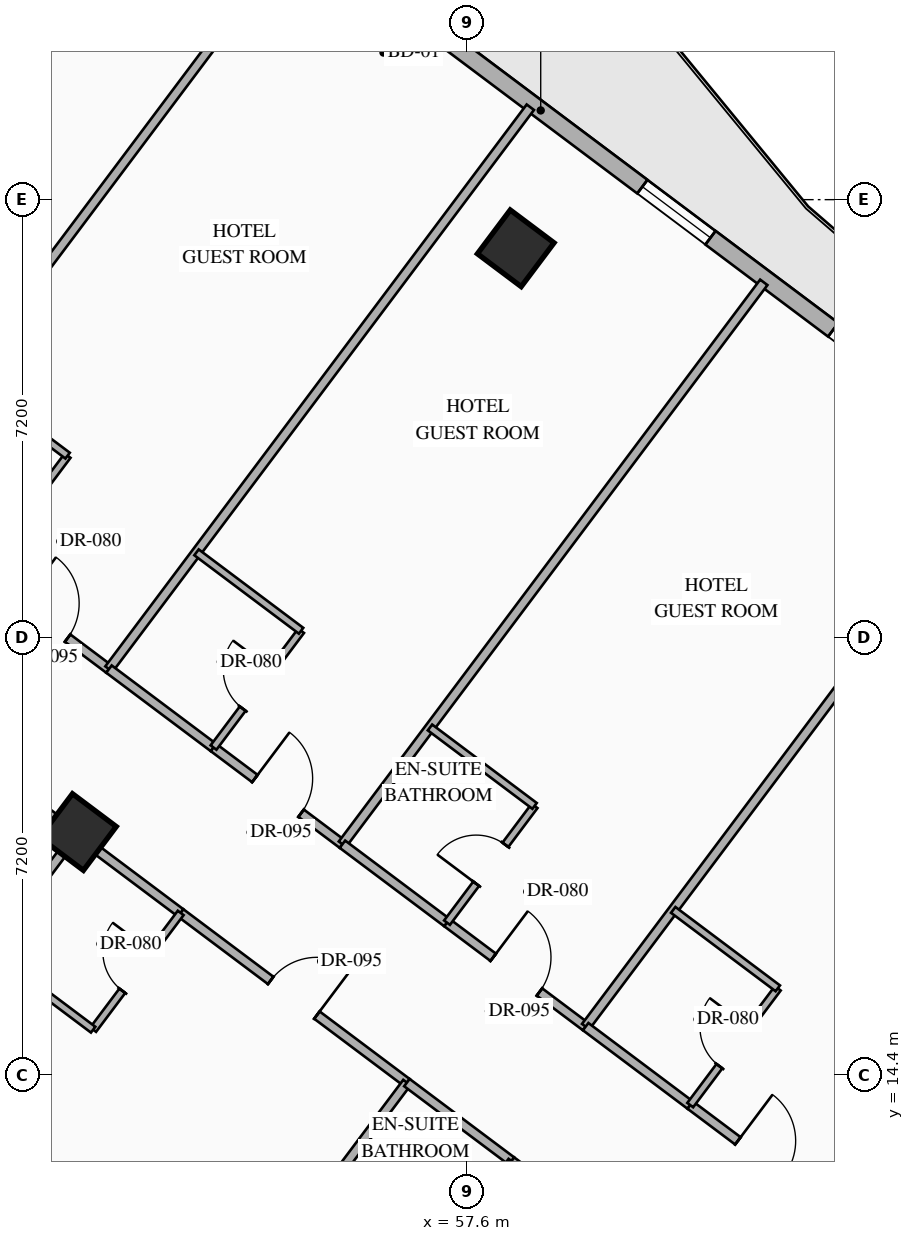
"""IFC4 building model, lengths in metres.
Left out: names, types, materials, properties, quantities, classifications, styles, units other than length and angle.
Written with IfcOpenShell. Run it as: python <this file> out.ifc"""

import sys

from ifc_helpers import new_model, si_unit, direction, frame, frame_2d, origin, origin_2d, place, context, subcontext, project, spatial, rectangle, hollow_rectangle, extrude, element, fill, save


model = new_model("IFC4")
c1 = context("Model", 3, precision=1e-05, world=origin(), true_north=direction((0.0, 1.0)))
c2 = subcontext(c1, "Body", "Model", "MODEL_VIEW")
j1 = project(units=[si_unit("LENGTHUNIT", "METRE"), si_unit("PLANEANGLEUNIT", "RADIAN")], contexts=[c1])
p1 = place(None, origin())
s1 = spatial("IfcSite", under=j1, at=p1, CompositionType="ELEMENT")
p2 = place(p1, origin())
s2 = spatial("IfcBuilding", under=s1, at=p2, CompositionType="ELEMENT")
p3 = place(p2, frame((0.0, 0.0, 88.0)))
s3 = spatial("IfcBuildingStorey", under=s2, at=p3, CompositionType="ELEMENT", Elevation=88.0)
for number, where, z_axis, x_axis in (
    (1, (58.4, 28.0, 0.0), (0.0, 0.0, 1.0), (0.8, -0.6, 0.0)),
    (2, (51.2, 18.4, 0.0), (0.0, 0.0, 1.0), (0.8, -0.6, 0.0)),
):
    element("IfcColumn", number, at=place(p3, frame(where, z_axis=z_axis, x_axis=x_axis)), inside=s3, PredefinedType="COLUMN", context=c2, shape_type="SweptSolid", body=[
        extrude(hollow_rectangle(XDim=0.9, YDim=0.9, WallThickness=0.036, at=origin_2d()), origin(), (0.0, 0.0, 1.0), 3.35),
    ])
p4 = place(p3, frame((44.86, 40.73, 0.0), z_axis=(0.0, 0.0, 1.0), x_axis=(0.800006902154, -0.599990797017, 0.0)))
e3 = element("IfcWall", 3, at=p4, inside=s3, PredefinedType="STANDARD", context=c2, shape_type="SweptSolid", body=[
    extrude(rectangle(XDim=29.712, YDim=0.28, at=frame_2d((14.856, 0.0))), origin(), (0.0, 0.0, 1.0), 3.05),
])
p5 = place(p4, frame((14.249, 0.0, 0.0)))
e4 = element("IfcOpeningElement", 4, at=p5, cuts=e3, PredefinedType="OPENING", context=c2, shape_type="SweptSolid", body=[
    extrude(rectangle(XDim=1.1, YDim=2.2, at=frame_2d((0.55, 1.1))), frame((0.0, 0.15, 0.0), z_axis=(0.0, -1.0, 0.0), x_axis=(1.0, 0.0, 0.0)), (0.0, 0.0, 1.0), 0.3),
])
p6 = place(p4, frame((1.612, 0.0, 0.85)))
e5 = element("IfcOpeningElement", 5, at=p6, cuts=e3, PredefinedType="OPENING", context=c2, shape_type="SweptSolid", body=[
    extrude(rectangle(XDim=1.4, YDim=1.8, at=frame_2d((0.7, 0.9))), frame((0.0, 0.15, 0.0), z_axis=(0.0, -1.0, 0.0), x_axis=(1.0, 0.0, 0.0)), (0.0, 0.0, 1.0), 0.3),
])
p7 = place(p4, frame((5.667, 0.0, 0.85)))
e6 = element("IfcOpeningElement", 6, at=p7, cuts=e3, PredefinedType="OPENING", context=c2, shape_type="SweptSolid", body=[
    extrude(rectangle(XDim=1.4, YDim=1.8, at=frame_2d((0.7, 0.9))), frame((0.0, 0.15, 0.0), z_axis=(0.0, -1.0, 0.0), x_axis=(1.0, 0.0, 0.0)), (0.0, 0.0, 1.0), 0.3),
])
p8 = place(p4, frame((9.912, 0.0, 0.85)))
e7 = element("IfcOpeningElement", 7, at=p8, cuts=e3, PredefinedType="OPENING", context=c2, shape_type="SweptSolid", body=[
    extrude(rectangle(XDim=1.4, YDim=1.8, at=frame_2d((0.7, 0.9))), frame((0.0, 0.15, 0.0), z_axis=(0.0, -1.0, 0.0), x_axis=(1.0, 0.0, 0.0)), (0.0, 0.0, 1.0), 0.3),
])
p9 = place(p4, frame((19.528, 0.0, 0.85)))
e8 = element("IfcOpeningElement", 8, at=p9, cuts=e3, PredefinedType="OPENING", context=c2, shape_type="SweptSolid", body=[
    extrude(rectangle(XDim=1.4, YDim=1.8, at=frame_2d((0.7, 0.9))), frame((0.0, 0.15, 0.0), z_axis=(0.0, -1.0, 0.0), x_axis=(1.0, 0.0, 0.0)), (0.0, 0.0, 1.0), 0.3),
])
p10 = place(p4, frame((23.451, 0.0, 0.85)))
e9 = element("IfcOpeningElement", 9, at=p10, cuts=e3, PredefinedType="OPENING", context=c2, shape_type="SweptSolid", body=[
    extrude(rectangle(XDim=1.4, YDim=1.8, at=frame_2d((0.7, 0.9))), frame((0.0, 0.15, 0.0), z_axis=(0.0, -1.0, 0.0), x_axis=(1.0, 0.0, 0.0)), (0.0, 0.0, 1.0), 0.3),
])
p11 = place(p4, frame((27.852, 0.0, 0.85)))
e10 = element("IfcOpeningElement", 10, at=p11, cuts=e3, PredefinedType="OPENING", context=c2, shape_type="SweptSolid", body=[
    extrude(rectangle(XDim=1.4, YDim=1.8, at=frame_2d((0.7, 0.9))), frame((0.0, 0.15, 0.0), z_axis=(0.0, -1.0, 0.0), x_axis=(1.0, 0.0, 0.0)), (0.0, 0.0, 1.0), 0.3),
])
p12 = place(p3, frame((49.59, 22.67, 0.0), z_axis=(0.0, 0.0, 1.0), x_axis=(0.800011056104, -0.599985258246, 0.0)))
e11 = element("IfcWall", 11, at=p12, inside=s3, PredefinedType="PARTITIONING", context=c2, shape_type="SweptSolid", body=[
    extrude(rectangle(XDim=2.65, YDim=0.15, at=frame_2d((1.325, 0.0))), origin(), (0.0, 0.0, 1.0), 2.695),
])
p13 = place(p12, frame((0.85, 0.0, 0.0)))
e12 = element("IfcOpeningElement", 12, at=p13, cuts=e11, PredefinedType="OPENING", context=c2, shape_type="SweptSolid", body=[
    extrude(rectangle(XDim=0.95, YDim=2.15, at=frame_2d((0.475, 1.075))), frame((0.0, 0.085, 0.0), z_axis=(0.0, -1.0, 0.0), x_axis=(1.0, 0.0, 0.0)), (0.0, 0.0, 1.0), 0.17),
])
p14 = place(p3, frame((49.59, 22.67, 0.0), z_axis=(0.0, 0.0, 1.0), x_axis=(0.599951172744, 0.800036618114, 0.0)))
e13 = element("IfcWall", 13, at=p14, inside=s3, PredefinedType="PARTITIONING", context=c2, shape_type="SweptSolid", body=[
    extrude(rectangle(XDim=2.4, YDim=0.12, at=frame_2d((1.2, 0.0))), origin(), (0.0, 0.0, 1.0), 3.05),
])
p15 = place(p14, frame((0.8, 0.0, 0.0)))
e14 = element("IfcOpeningElement", 14, at=p15, cuts=e13, PredefinedType="OPENING", context=c2, shape_type="SweptSolid", body=[
    extrude(rectangle(XDim=0.8, YDim=2.06, at=frame_2d((0.4, 1.03))), frame((0.0, 0.07, 0.0), z_axis=(0.0, -1.0, 0.0), x_axis=(1.0, 0.0, 0.0)), (0.0, 0.0, 1.0), 0.14),
])
p16 = place(p3, frame((49.31, 25.88, 0.0), z_axis=(0.0, 0.0, 1.0), x_axis=(0.800040880289, -0.59994548908, 0.0)))
e15 = element("IfcWall", 15, at=p16, inside=s3, PredefinedType="PARTITIONING", context=c2, shape_type="SweptSolid", body=[
    extrude(rectangle(XDim=2.15, YDim=0.12, at=frame_2d((1.075, 0.0))), origin(), (0.0, 0.0, 1.0), 3.05),
])
for number, where, z_axis, x_axis in (
    (16, (47.87, 23.96, 0.0), (0.0, 0.0, 1.0), (0.6, 0.8, 0.0)),
    (17, (51.71, 21.08, 0.0), (0.0, 0.0, 1.0), (0.6, 0.8, 0.0)),
):
    element("IfcWall", number, at=place(p3, frame(where, z_axis=z_axis, x_axis=x_axis)), inside=s3, PredefinedType="PARTITIONING", context=c2, shape_type="SweptSolid", body=[
        extrude(rectangle(XDim=11.55, YDim=0.15, at=frame_2d((5.775, 0.0))), origin(), (0.0, 0.0, 1.0), 3.05),
    ])
p17 = place(p3, frame((51.71, 21.08, 0.0), z_axis=(0.0, 0.0, 1.0), x_axis=(0.79998637334, -0.60001816845, 0.0)))
e18 = element("IfcWall", 18, at=p17, inside=s3, PredefinedType="PARTITIONING", context=c2, shape_type="SweptSolid", body=[
    extrude(rectangle(XDim=2.15, YDim=0.15, at=frame_2d((1.075, 0.0))), origin(), (0.0, 0.0, 1.0), 2.695),
])
p18 = place(p3, frame((53.43, 19.79, 0.0), z_axis=(0.0, 0.0, 1.0), x_axis=(0.8, -0.6, 0.0)))
e19 = element("IfcWall", 19, at=p18, inside=s3, PredefinedType="PARTITIONING", context=c2, shape_type="SweptSolid", body=[
    extrude(rectangle(XDim=2.65, YDim=0.15, at=frame_2d((1.325, 0.0))), origin(), (0.0, 0.0, 1.0), 2.695),
])
p19 = place(p18, frame((0.85, 0.0, 0.0)))
e20 = element("IfcOpeningElement", 20, at=p19, cuts=e19, PredefinedType="OPENING", context=c2, shape_type="SweptSolid", body=[
    extrude(rectangle(XDim=0.95, YDim=2.15, at=frame_2d((0.475, 1.075))), frame((0.0, 0.085, 0.0), z_axis=(0.0, -1.0, 0.0), x_axis=(1.0, 0.0, 0.0)), (0.0, 0.0, 1.0), 0.17),
])
p20 = place(p3, frame((53.43, 19.79, 0.0), z_axis=(0.0, 0.0, 1.0), x_axis=(0.600065100855, 0.79995117022, 0.0)))
e21 = element("IfcWall", 21, at=p20, inside=s3, PredefinedType="PARTITIONING", context=c2, shape_type="SweptSolid", body=[
    extrude(rectangle(XDim=2.4, YDim=0.12, at=frame_2d((1.2, 0.0))), origin(), (0.0, 0.0, 1.0), 3.05),
])
p21 = place(p20, frame((0.8, 0.0, 0.0)))
e22 = element("IfcOpeningElement", 22, at=p21, cuts=e21, PredefinedType="OPENING", context=c2, shape_type="SweptSolid", body=[
    extrude(rectangle(XDim=0.8, YDim=2.06, at=frame_2d((0.4, 1.03))), frame((0.0, 0.07, 0.0), z_axis=(0.0, -1.0, 0.0), x_axis=(1.0, 0.0, 0.0)), (0.0, 0.0, 1.0), 0.14),
])
p22 = place(p3, frame((53.15, 23.0, 0.0), z_axis=(0.0, 0.0, 1.0), x_axis=(0.800027249606, -0.599963665473, 0.0)))
e23 = element("IfcWall", 23, at=p22, inside=s3, PredefinedType="PARTITIONING", context=c2, shape_type="SweptSolid", body=[
    extrude(rectangle(XDim=2.15, YDim=0.12, at=frame_2d((1.075, 0.0))), origin(), (0.0, 0.0, 1.0), 3.05),
])
p23 = place(p3, frame((55.55, 18.2, 0.0), z_axis=(0.0, 0.0, 1.0), x_axis=(0.599996617946, 0.80000253653, 0.0)))
e24 = element("IfcWall", 24, at=p23, inside=s3, PredefinedType="PARTITIONING", context=c2, shape_type="SweptSolid", body=[
    extrude(rectangle(XDim=11.55, YDim=0.15, at=frame_2d((5.775, 0.0))), origin(), (0.0, 0.0, 1.0), 3.05),
])
p24 = place(p3, frame((55.55, 18.2, 0.0), z_axis=(0.0, 0.0, 1.0), x_axis=(0.79998637334, -0.60001816845, 0.0)))
e25 = element("IfcWall", 25, at=p24, inside=s3, PredefinedType="PARTITIONING", context=c2, shape_type="SweptSolid", body=[
    extrude(rectangle(XDim=2.15, YDim=0.15, at=frame_2d((1.075, 0.0))), origin(), (0.0, 0.0, 1.0), 2.695),
])
p25 = place(p3, frame((57.27, 16.91, 0.0), z_axis=(0.0, 0.0, 1.0), x_axis=(0.800010279488, -0.599986293772, 0.0)))
e26 = element("IfcWall", 26, at=p25, inside=s3, PredefinedType="PARTITIONING", context=c2, shape_type="SweptSolid", body=[
    extrude(rectangle(XDim=2.85, YDim=0.15, at=frame_2d((1.425, 0.0))), origin(), (0.0, 0.0, 1.0), 2.695),
])
p26 = place(p25, frame((0.95, 0.0, 0.0)))
e27 = element("IfcOpeningElement", 27, at=p26, cuts=e26, PredefinedType="OPENING", context=c2, shape_type="SweptSolid", body=[
    extrude(rectangle(XDim=0.95, YDim=2.15, at=frame_2d((0.475, 1.075))), frame((0.0, 0.085, 0.0), z_axis=(0.0, -1.0, 0.0), x_axis=(1.0, 0.0, 0.0)), (0.0, 0.0, 1.0), 0.17),
])
p27 = place(p3, frame((57.27, 16.91, 0.0), z_axis=(0.0, 0.0, 1.0), x_axis=(0.599951172744, 0.800036618114, 0.0)))
e28 = element("IfcWall", 28, at=p27, inside=s3, PredefinedType="PARTITIONING", context=c2, shape_type="SweptSolid", body=[
    extrude(rectangle(XDim=2.4, YDim=0.12, at=frame_2d((1.2, 0.0))), origin(), (0.0, 0.0, 1.0), 3.05),
])
p28 = place(p27, frame((0.8, 0.0, 0.0)))
e29 = element("IfcOpeningElement", 29, at=p28, cuts=e28, PredefinedType="OPENING", context=c2, shape_type="SweptSolid", body=[
    extrude(rectangle(XDim=0.8, YDim=2.06, at=frame_2d((0.4, 1.03))), frame((0.0, 0.07, 0.0), z_axis=(0.0, -1.0, 0.0), x_axis=(1.0, 0.0, 0.0)), (0.0, 0.0, 1.0), 0.14),
])
p29 = place(p3, frame((56.99, 20.12, 0.0), z_axis=(0.0, 0.0, 1.0), x_axis=(0.79998637334, -0.60001816845, 0.0)))
e30 = element("IfcWall", 30, at=p29, inside=s3, PredefinedType="PARTITIONING", context=c2, shape_type="SweptSolid", body=[
    extrude(rectangle(XDim=2.15, YDim=0.12, at=frame_2d((1.075, 0.0))), origin(), (0.0, 0.0, 1.0), 3.05),
])
p30 = place(p3, frame((59.55, 15.2, 0.0), z_axis=(0.0, 0.0, 1.0), x_axis=(0.599996617946, 0.80000253653, 0.0)))
e31 = element("IfcWall", 31, at=p30, inside=s3, PredefinedType="PARTITIONING", context=c2, shape_type="SweptSolid", body=[
    extrude(rectangle(XDim=11.55, YDim=0.15, at=frame_2d((5.775, 0.0))), origin(), (0.0, 0.0, 1.0), 3.05),
])
p31 = place(p3, frame((59.55, 15.2, 0.0), z_axis=(0.0, 0.0, 1.0), x_axis=(0.79998637334, -0.60001816845, 0.0)))
e32 = element("IfcWall", 32, at=p31, inside=s3, PredefinedType="PARTITIONING", context=c2, shape_type="SweptSolid", body=[
    extrude(rectangle(XDim=2.15, YDim=0.15, at=frame_2d((1.075, 0.0))), origin(), (0.0, 0.0, 1.0), 2.695),
])
p32 = place(p3, frame((61.27, 13.91, 0.0), z_axis=(0.0, 0.0, 1.0), x_axis=(0.800010068184, -0.59998657552, 0.0)))
e33 = element("IfcWall", 33, at=p32, inside=s3, PredefinedType="PARTITIONING", context=c2, shape_type="SweptSolid", body=[
    extrude(rectangle(XDim=2.91, YDim=0.15, at=frame_2d((1.455, 0.0))), origin(), (0.0, 0.0, 1.0), 3.05),
])
p33 = place(p32, frame((0.98, 0.0, 0.0)))
e34 = element("IfcOpeningElement", 34, at=p33, cuts=e33, PredefinedType="OPENING", context=c2, shape_type="SweptSolid", body=[
    extrude(rectangle(XDim=0.95, YDim=2.15, at=frame_2d((0.475, 1.075))), frame((0.0, 0.085, 0.0), z_axis=(0.0, -1.0, 0.0), x_axis=(1.0, 0.0, 0.0)), (0.0, 0.0, 1.0), 0.17),
])
p34 = place(p3, frame((61.27, 13.91, 0.0), z_axis=(0.0, 0.0, 1.0), x_axis=(0.599951172744, 0.800036618114, 0.0)))
e35 = element("IfcWall", 35, at=p34, inside=s3, PredefinedType="PARTITIONING", context=c2, shape_type="SweptSolid", body=[
    extrude(rectangle(XDim=2.4, YDim=0.12, at=frame_2d((1.2, 0.0))), origin(), (0.0, 0.0, 1.0), 3.05),
])
p35 = place(p34, frame((0.8, 0.0, 0.0)))
e36 = element("IfcOpeningElement", 36, at=p35, cuts=e35, PredefinedType="OPENING", context=c2, shape_type="SweptSolid", body=[
    extrude(rectangle(XDim=0.8, YDim=2.06, at=frame_2d((0.4, 1.03))), frame((0.0, 0.07, 0.0), z_axis=(0.0, -1.0, 0.0), x_axis=(1.0, 0.0, 0.0)), (0.0, 0.0, 1.0), 0.14),
])
p36 = place(p3, frame((60.99, 17.12, 0.0), z_axis=(0.0, 0.0, 1.0), x_axis=(0.79998637334, -0.60001816845, 0.0)))
e37 = element("IfcWall", 37, at=p36, inside=s3, PredefinedType="PARTITIONING", context=c2, shape_type="SweptSolid", body=[
    extrude(rectangle(XDim=2.15, YDim=0.12, at=frame_2d((1.075, 0.0))), origin(), (0.0, 0.0, 1.0), 3.05),
])
p37 = place(p3, frame((49.45, 19.65, 0.0), z_axis=(0.0, 0.0, 1.0), x_axis=(0.800040880289, -0.59994548908, 0.0)))
e38 = element("IfcWall", 38, at=p37, inside=s3, PredefinedType="PARTITIONING", context=c2, shape_type="SweptSolid", body=[
    extrude(rectangle(XDim=2.15, YDim=0.15, at=frame_2d((1.075, 0.0))), origin(), (0.0, 0.0, 1.0), 2.345),
])
p38 = place(p3, frame((44.36, 9.28, 0.0), z_axis=(0.0, 0.0, 1.0), x_axis=(0.599986233332, 0.800010324816, 0.0)))
e39 = element("IfcWall", 39, at=p38, inside=s3, PredefinedType="PARTITIONING", context=c2, shape_type="SweptSolid", body=[
    extrude(rectangle(XDim=11.35, YDim=0.15, at=frame_2d((5.675, 0.0))), origin(), (0.0, 0.0, 1.0), 2.345),
])
p39 = place(p3, frame((51.17, 18.36, 0.0), z_axis=(0.0, 0.0, 1.0), x_axis=(0.79998637334, -0.60001816845, 0.0)))
e40 = element("IfcWall", 40, at=p39, inside=s3, PredefinedType="PARTITIONING", context=c2, shape_type="SweptSolid", body=[
    extrude(rectangle(XDim=2.15, YDim=0.15, at=frame_2d((1.075, 0.0))), origin(), (0.0, 0.0, 1.0), 2.345),
])
p40 = place(p3, frame((52.89, 17.07, 0.0), z_axis=(0.0, 0.0, 1.0), x_axis=(0.800012600101, -0.599983199498, 0.0)))
e41 = element("IfcWall", 41, at=p40, inside=s3, PredefinedType="PARTITIONING", context=c2, shape_type="SweptSolid", body=[
    extrude(rectangle(XDim=4.65, YDim=0.15, at=frame_2d((2.325, 0.0))), origin(), (0.0, 0.0, 1.0), 2.345),
])
p41 = place(p40, frame((1.85, 0.0, 0.0)))
e42 = element("IfcOpeningElement", 42, at=p41, cuts=e41, PredefinedType="OPENING", context=c2, shape_type="SweptSolid", body=[
    extrude(rectangle(XDim=0.95, YDim=2.15, at=frame_2d((0.475, 1.075))), frame((0.0, 0.085, 0.0), z_axis=(0.0, -1.0, 0.0), x_axis=(1.0, 0.0, 0.0)), (0.0, 0.0, 1.0), 0.17),
])
p42 = place(p3, frame((51.45, 15.15, 0.0), z_axis=(0.0, 0.0, 1.0), x_axis=(0.599951172744, 0.800036618114, 0.0)))
e43 = element("IfcWall", 43, at=p42, inside=s3, PredefinedType="PARTITIONING", context=c2, shape_type="SweptSolid", body=[
    extrude(rectangle(XDim=2.4, YDim=0.12, at=frame_2d((1.2, 0.0))), origin(), (0.0, 0.0, 1.0), 3.05),
])
p43 = place(p42, frame((0.8, 0.0, 0.0)))
e44 = element("IfcOpeningElement", 44, at=p43, cuts=e43, PredefinedType="OPENING", context=c2, shape_type="SweptSolid", body=[
    extrude(rectangle(XDim=0.8, YDim=2.06, at=frame_2d((0.4, 1.03))), frame((0.0, 0.07, 0.0), z_axis=(0.0, -1.0, 0.0), x_axis=(1.0, 0.0, 0.0)), (0.0, 0.0, 1.0), 0.14),
])
p44 = place(p3, frame((49.73, 16.44, 0.0), z_axis=(0.0, 0.0, 1.0), x_axis=(0.79998637334, -0.60001816845, 0.0)))
e45 = element("IfcWall", 45, at=p44, inside=s3, PredefinedType="PARTITIONING", context=c2, shape_type="SweptSolid", body=[
    extrude(rectangle(XDim=2.15, YDim=0.12, at=frame_2d((1.075, 0.0))), origin(), (0.0, 0.0, 1.0), 3.05),
])
p45 = place(p3, frame((49.8, 5.2, 0.0), z_axis=(0.0, 0.0, 1.0), x_axis=(0.6, 0.8, 0.0)))
e46 = element("IfcWall", 46, at=p45, inside=s3, PredefinedType="PARTITIONING", context=c2, shape_type="SweptSolid", body=[
    extrude(rectangle(XDim=11.35, YDim=0.15, at=frame_2d((5.675, 0.0))), origin(), (0.0, 0.0, 1.0), 3.05),
])
p46 = place(p3, frame((56.61, 14.28, 0.0), z_axis=(0.0, 0.0, 1.0), x_axis=(0.79998637334, -0.60001816845, 0.0)))
e47 = element("IfcWall", 47, at=p46, inside=s3, PredefinedType="PARTITIONING", context=c2, shape_type="SweptSolid", body=[
    extrude(rectangle(XDim=2.15, YDim=0.15, at=frame_2d((1.075, 0.0))), origin(), (0.0, 0.0, 1.0), 2.345),
])
p47 = place(p3, frame((58.33, 12.99, 0.0), z_axis=(0.0, 0.0, 1.0), x_axis=(0.799993779569, -0.600008293819, 0.0)))
e48 = element("IfcWall", 48, at=p47, inside=s3, PredefinedType="PARTITIONING", context=c2, shape_type="SweptSolid", body=[
    extrude(rectangle(XDim=4.71, YDim=0.15, at=frame_2d((2.355, 0.0))), origin(), (0.0, 0.0, 1.0), 2.345),
])
p48 = place(p47, frame((3.23, 0.0, 0.0)))
e49 = element("IfcOpeningElement", 49, at=p48, cuts=e48, PredefinedType="OPENING", context=c2, shape_type="SweptSolid", body=[
    extrude(rectangle(XDim=0.95, YDim=2.15, at=frame_2d((0.475, 1.075))), frame((0.0, 0.085, 0.0), z_axis=(0.0, -1.0, 0.0), x_axis=(1.0, 0.0, 0.0)), (0.0, 0.0, 1.0), 0.17),
])
p49 = place(p3, frame((56.89, 11.07, 0.0), z_axis=(0.0, 0.0, 1.0), x_axis=(0.600065100855, 0.79995117022, 0.0)))
e50 = element("IfcWall", 50, at=p49, inside=s3, PredefinedType="PARTITIONING", context=c2, shape_type="SweptSolid", body=[
    extrude(rectangle(XDim=2.4, YDim=0.12, at=frame_2d((1.2, 0.0))), origin(), (0.0, 0.0, 1.0), 3.05),
])
p50 = place(p49, frame((0.8, 0.0, 0.0)))
e51 = element("IfcOpeningElement", 51, at=p50, cuts=e50, PredefinedType="OPENING", context=c2, shape_type="SweptSolid", body=[
    extrude(rectangle(XDim=0.8, YDim=2.06, at=frame_2d((0.4, 1.03))), frame((0.0, 0.07, 0.0), z_axis=(0.0, -1.0, 0.0), x_axis=(1.0, 0.0, 0.0)), (0.0, 0.0, 1.0), 0.14),
])
p51 = place(p9, origin())
e52 = element("IfcWindow", 52, at=p51, inside=s3, PartitioningType="SINGLE_PANEL", PredefinedType="WINDOW", context=c2, shape_type="SweptSolid", body=[
    extrude(rectangle(XDim=1.4, YDim=1.8, at=frame_2d((0.7, 0.9))), frame((0.0, 0.03, 0.0), z_axis=(0.0, -1.0, 0.0), x_axis=(1.0, 0.0, 0.0)), (0.0, 0.0, 1.0), 0.06),
])
fill(e8, e52)
p52 = place(p10, origin())
e53 = element("IfcWindow", 53, at=p52, inside=s3, PartitioningType="SINGLE_PANEL", PredefinedType="WINDOW", context=c2, shape_type="SweptSolid", body=[
    extrude(rectangle(XDim=1.4, YDim=1.8, at=frame_2d((0.7, 0.9))), frame((0.0, 0.03, 0.0), z_axis=(0.0, -1.0, 0.0), x_axis=(1.0, 0.0, 0.0)), (0.0, 0.0, 1.0), 0.06),
])
fill(e9, e53)
p53 = place(p13, origin())
e54 = element("IfcDoor", 54, at=p53, inside=s3, OperationType="SINGLE_SWING_LEFT", PredefinedType="DOOR", context=c2, shape_type="SweptSolid", body=[
    extrude(rectangle(XDim=0.95, YDim=2.15, at=frame_2d((0.475, 1.075))), frame((0.0, 0.025, 0.0), z_axis=(0.0, -1.0, 0.0), x_axis=(1.0, 0.0, 0.0)), (0.0, 0.0, 1.0), 0.05),
])
fill(e12, e54)
p54 = place(p19, origin())
e55 = element("IfcDoor", 55, at=p54, inside=s3, OperationType="SINGLE_SWING_LEFT", PredefinedType="DOOR", context=c2, shape_type="SweptSolid", body=[
    extrude(rectangle(XDim=0.95, YDim=2.15, at=frame_2d((0.475, 1.075))), frame((0.0, 0.025, 0.0), z_axis=(0.0, -1.0, 0.0), x_axis=(1.0, 0.0, 0.0)), (0.0, 0.0, 1.0), 0.05),
])
fill(e20, e55)
p55 = place(p21, origin())
e56 = element("IfcDoor", 56, at=p55, inside=s3, OperationType="SINGLE_SWING_RIGHT", PredefinedType="DOOR", context=c2, shape_type="SweptSolid", body=[
    extrude(rectangle(XDim=0.8, YDim=2.06, at=frame_2d((0.4, 1.03))), frame((0.0, 0.025, 0.0), z_axis=(0.0, -1.0, 0.0), x_axis=(1.0, 0.0, 0.0)), (0.0, 0.0, 1.0), 0.05),
])
fill(e22, e56)
p56 = place(p26, origin())
e57 = element("IfcDoor", 57, at=p56, inside=s3, OperationType="SINGLE_SWING_LEFT", PredefinedType="DOOR", context=c2, shape_type="SweptSolid", body=[
    extrude(rectangle(XDim=0.95, YDim=2.15, at=frame_2d((0.475, 1.075))), frame((0.0, 0.025, 0.0), z_axis=(0.0, -1.0, 0.0), x_axis=(1.0, 0.0, 0.0)), (0.0, 0.0, 1.0), 0.05),
])
fill(e27, e57)
p57 = place(p28, origin())
e58 = element("IfcDoor", 58, at=p57, inside=s3, OperationType="SINGLE_SWING_LEFT", PredefinedType="DOOR", context=c2, shape_type="SweptSolid", body=[
    extrude(rectangle(XDim=0.8, YDim=2.06, at=frame_2d((0.4, 1.03))), frame((0.0, 0.025, 0.0), z_axis=(0.0, -1.0, 0.0), x_axis=(1.0, 0.0, 0.0)), (0.0, 0.0, 1.0), 0.05),
])
fill(e29, e58)
p58 = place(p33, origin())
e59 = element("IfcDoor", 59, at=p58, inside=s3, OperationType="SINGLE_SWING_LEFT", PredefinedType="DOOR", context=c2, shape_type="SweptSolid", body=[
    extrude(rectangle(XDim=0.95, YDim=2.15, at=frame_2d((0.475, 1.075))), frame((0.0, 0.025, 0.0), z_axis=(0.0, -1.0, 0.0), x_axis=(1.0, 0.0, 0.0)), (0.0, 0.0, 1.0), 0.05),
])
fill(e34, e59)
p59 = place(p35, origin())
e60 = element("IfcDoor", 60, at=p59, inside=s3, OperationType="SINGLE_SWING_RIGHT", PredefinedType="DOOR", context=c2, shape_type="SweptSolid", body=[
    extrude(rectangle(XDim=0.8, YDim=2.06, at=frame_2d((0.4, 1.03))), frame((0.0, 0.025, 0.0), z_axis=(0.0, -1.0, 0.0), x_axis=(1.0, 0.0, 0.0)), (0.0, 0.0, 1.0), 0.05),
])
fill(e36, e60)
p60 = place(p41, origin())
e61 = element("IfcDoor", 61, at=p60, inside=s3, OperationType="SINGLE_SWING_RIGHT", PredefinedType="DOOR", context=c2, shape_type="SweptSolid", body=[
    extrude(rectangle(XDim=0.95, YDim=2.15, at=frame_2d((0.475, 1.075))), frame((0.0, 0.025, 0.0), z_axis=(0.0, -1.0, 0.0), x_axis=(1.0, 0.0, 0.0)), (0.0, 0.0, 1.0), 0.05),
])
fill(e42, e61)
p61 = place(p43, origin())
e62 = element("IfcDoor", 62, at=p61, inside=s3, OperationType="SINGLE_SWING_RIGHT", PredefinedType="DOOR", context=c2, shape_type="SweptSolid", body=[
    extrude(rectangle(XDim=0.8, YDim=2.06, at=frame_2d((0.4, 1.03))), frame((0.0, 0.025, 0.0), z_axis=(0.0, -1.0, 0.0), x_axis=(1.0, 0.0, 0.0)), (0.0, 0.0, 1.0), 0.05),
])
fill(e44, e62)
save(model, sys.argv[1])
